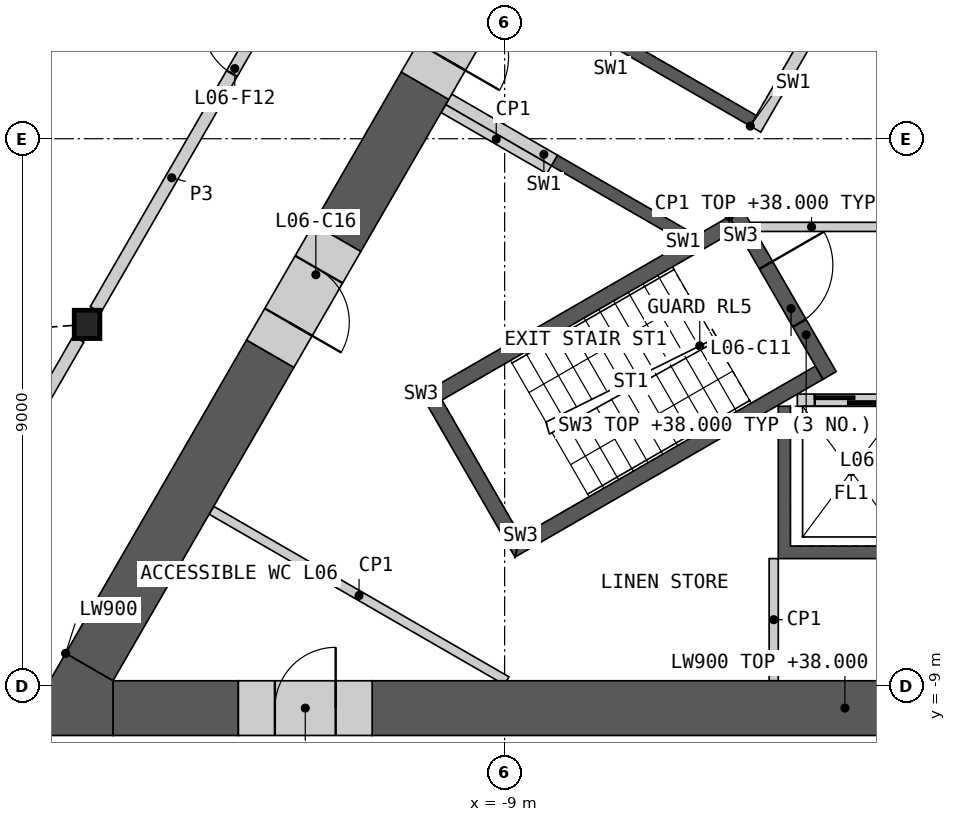
"""IFC4 building model, lengths in metres.
Left out: names, types, materials, properties, quantities, classifications, styles, units other than length and angle.
Written with IfcOpenShell. Run it as: python <this file> out.ifc"""

import sys

from ifc_helpers import new_model, si_unit, direction, frame, frame_2d, origin, origin_2d, place, context, subcontext, project, spatial, polyline, rectangle, i_section, outline, extrude, element, fill, save


model = new_model("IFC4")
c1 = context("Model", 3, precision=1e-05, world=origin(), true_north=direction((0.0, 1.0)))
c2 = subcontext(c1, "Body", "Model", "MODEL_VIEW")
j1 = project(units=[si_unit("LENGTHUNIT", "METRE"), si_unit("PLANEANGLEUNIT", "RADIAN")], contexts=[c1])
p1 = place(None, origin())
s1 = spatial("IfcSite", under=j1, at=p1, CompositionType="ELEMENT")
p2 = place(p1, origin())
s2 = spatial("IfcBuilding", under=s1, at=p2, CompositionType="ELEMENT")
p3 = place(p2, frame((0.0, 0.0, 34.2)))
s3 = spatial("IfcBuildingStorey", under=s2, at=p3, CompositionType="ELEMENT", Elevation=34.2)
p4 = place(p3, frame((-15.868, -3.054, 0.0), z_axis=(0.0, 0.0, 1.0), x_axis=(1.0, 0.0, 0.0)))
e1 = element("IfcColumn", 1, at=p4, inside=s3, PredefinedType="COLUMN", context=c2, shape_type="SweptSolid", body=[
    extrude(i_section(OverallWidth=0.421, OverallDepth=0.465, WebThickness=0.045, FlangeThickness=0.072, at=origin_2d()), origin(), (0.0, 0.0, 1.0), 4.2),
])
p5 = place(p3, origin())
e2 = element("IfcWall", 2, at=p5, inside=s3, PredefinedType="SHEAR", context=c2, shape_type="SweptSolid", body=[
    extrude(outline(polyline([(4.5, -4.4), (4.5, -6.906), (-4.5, -6.906), (-4.5, -4.4), (-4.3, -4.4), (-4.3, -6.7), (-2.3, -6.7), (-2.3, -4.4), (-2.1, -4.4), (-2.1, -6.7), (-0.1, -6.7), (-0.1, -4.4), (0.1, -4.4), (0.1, -6.7), (2.1, -6.7), (2.1, -4.4), (2.3, -4.4), (2.3, -6.7), (4.3, -6.7), (4.3, -4.4), (4.5, -4.4)])), origin(), (0.0, 0.0, 1.0), 3.8),
])
p6 = place(p3, frame((-4.187, -4.3, 0.0), z_axis=(0.0, 0.0, 1.0), x_axis=(1.0, 0.0, 0.0)))
e3 = element("IfcWall", 3, at=p6, inside=s3, PredefinedType="SOLIDWALL", context=c2, shape_type="SweptSolid", body=[
    extrude(rectangle(XDim=8.373, YDim=0.2, at=frame_2d((4.187, 0.0))), origin(), (0.0, 0.0, 1.0), 3.8),
])
p7 = place(p6, frame((0.287, 0.0, 0.0)))
e4 = element("IfcOpeningElement", 4, at=p7, cuts=e3, PredefinedType="OPENING", context=c2, shape_type="SweptSolid", body=[
    extrude(rectangle(XDim=1.2, YDim=2.1, at=frame_2d((0.6, 1.05))), frame((0.0, 0.11, 0.0), z_axis=(0.0, -1.0, 0.0), x_axis=(1.0, 0.0, 0.0)), (0.0, 0.0, 1.0), 0.22),
])
p8 = place(p6, frame((2.387, 0.0, 0.0)))
e5 = element("IfcOpeningElement", 5, at=p8, cuts=e3, PredefinedType="OPENING", context=c2, shape_type="SweptSolid", body=[
    extrude(rectangle(XDim=1.4, YDim=2.1, at=frame_2d((0.7, 1.05))), frame((0.0, 0.11, 0.0), z_axis=(0.0, -1.0, 0.0), x_axis=(1.0, 0.0, 0.0)), (0.0, 0.0, 1.0), 0.22),
])
p9 = place(p6, frame((4.737, 0.0, 0.0)))
e6 = element("IfcOpeningElement", 6, at=p9, cuts=e3, PredefinedType="OPENING", context=c2, shape_type="SweptSolid", body=[
    extrude(rectangle(XDim=1.1, YDim=2.1, at=frame_2d((0.55, 1.05))), frame((0.0, 0.11, 0.0), z_axis=(0.0, -1.0, 0.0), x_axis=(1.0, 0.0, 0.0)), (0.0, 0.0, 1.0), 0.22),
])
p10 = place(p6, frame((6.887, 0.0, 0.0)))
e7 = element("IfcOpeningElement", 7, at=p10, cuts=e3, PredefinedType="OPENING", context=c2, shape_type="SweptSolid", body=[
    extrude(rectangle(XDim=1.2, YDim=2.1, at=frame_2d((0.6, 1.05))), frame((0.0, 0.11, 0.0), z_axis=(0.0, -1.0, 0.0), x_axis=(1.0, 0.0, 0.0)), (0.0, 0.0, 1.0), 0.22),
])
p11 = place(p3, origin())
e8 = element("IfcWall", 8, at=p11, inside=s3, PredefinedType="SHEAR", context=c2, shape_type="SweptSolid", body=[
    extrude(outline(polyline([(-6.061, -1.697), (-8.231, -0.444), (-8.131, -0.271), (-5.96, -1.524), (-6.061, -1.697)])), origin(), (0.0, 0.0, 1.0), 3.8),
])
p12 = place(p3, origin())
e9 = element("IfcWall", 9, at=p12, inside=s3, PredefinedType="SHEAR", context=c2, shape_type="SweptSolid", body=[
    extrude(outline(polyline([(-4.96, 0.208), (-7.131, 1.461), (-3.731, 7.35), (-1.561, 6.097), (-1.66, 5.924), (-3.652, 7.074), (-5.752, 3.437), (-3.76, 2.287), (-3.861, 2.113), (-5.852, 3.263), (-6.852, 1.531), (-4.861, 0.381), (-4.96, 0.208)])), origin(), (0.0, 0.0, 1.0), 3.8),
])
p13 = place(p3, frame((-1.631, 5.776, 0.0), z_axis=(0.0, 0.0, 1.0), x_axis=(-0.499992876559, -0.866029516466, 0.0)))
e10 = element("IfcWall", 10, at=p13, inside=s3, PredefinedType="SOLIDWALL", context=c2, shape_type="SweptSolid", body=[
    extrude(rectangle(XDim=6.486, YDim=0.2, at=frame_2d((3.243, 0.0))), origin(), (0.0, 0.0, 1.0), 3.8),
])
p14 = place(p13, frame((1.537, 0.0, 0.0)))
e11 = element("IfcOpeningElement", 11, at=p14, cuts=e10, PredefinedType="OPENING", context=c2, shape_type="SweptSolid", body=[
    extrude(rectangle(XDim=0.9, YDim=2.1, at=frame_2d((0.45, 1.05))), frame((0.0, 0.11, 0.0), z_axis=(0.0, -1.0, 0.0), x_axis=(1.0, 0.0, 0.0)), (0.0, 0.0, 1.0), 0.22),
])
p15 = place(p3, frame((-8.181, -0.357, 0.0), z_axis=(0.0, 0.0, 1.0), x_axis=(-0.866035824272, 0.499981950752, 0.0)))
e12 = element("IfcWall", 12, at=p15, inside=s3, PredefinedType="SHEAR", context=c2, shape_type="SweptSolid", body=[
    extrude(rectangle(XDim=2.009, YDim=0.2, at=frame_2d((1.004, 0.0))), origin(), (0.0, 0.0, 1.0), 3.8),
])
p16 = place(p3, frame((-4.941, -1.45, 0.0), z_axis=(0.0, 0.0, 1.0), x_axis=(1.0, 0.0, 0.0)))
e13 = element("IfcWall", 13, at=p16, inside=s3, PredefinedType="PARTITIONING", context=c2, shape_type="SweptSolid", body=[
    extrude(rectangle(XDim=9.882, YDim=0.15, at=frame_2d((4.941, 0.0))), origin(), (0.0, 0.0, 1.0), 3.8),
])
p17 = place(p16, frame((4.391, 0.0, 0.0)))
e14 = element("IfcOpeningElement", 14, at=p17, cuts=e13, PredefinedType="OPENING", context=c2, shape_type="SweptSolid", body=[
    extrude(rectangle(XDim=1.1, YDim=2.1, at=frame_2d((0.55, 1.05))), frame((0.0, 0.085, 0.0), z_axis=(0.0, -1.0, 0.0), x_axis=(1.0, 0.0, 0.0)), (0.0, 0.0, 1.0), 0.17),
])
p18 = place(p3, origin())
e15 = element("IfcWall", 15, at=p18, inside=s3, PredefinedType="SHEAR", context=c2, shape_type="SweptSolid", body=[
    extrude(outline(polyline([(-5.307, -1.281), (-10.374, -4.206), (-10.032, -4.298), (-5.182, -1.498), (-5.307, -1.281)])), origin(), (0.0, 0.0, 1.0), 3.8),
])
p19 = place(p3, origin())
e16 = element("IfcWall", 16, at=p19, inside=s3, PredefinedType="SHEAR", context=c2, shape_type="SweptSolid", body=[
    extrude(outline(polyline([(-10.374, -4.206), (-8.83, -6.881), (-8.738, -6.539), (-10.032, -4.298), (-10.374, -4.206)])), origin(), (0.0, 0.0, 1.0), 3.8),
])
p20 = place(p3, origin())
e17 = element("IfcWall", 17, at=p20, inside=s3, PredefinedType="SHEAR", context=c2, shape_type="SweptSolid", body=[
    extrude(outline(polyline([(-8.738, -6.539), (-8.83, -6.881), (-3.763, -3.956), (-3.888, -3.739), (-8.738, -6.539)])), origin(), (0.0, 0.0, 1.0), 3.8),
])
p21 = place(p3, frame((-5.199, -1.219, 0.0), z_axis=(0.0, 0.0, 1.0), x_axis=(0.499982516597, -0.866035497597, 0.0)))
e18 = element("IfcWall", 18, at=p21, inside=s3, PredefinedType="SHEAR", context=c2, shape_type="SweptSolid", body=[
    extrude(rectangle(XDim=3.088, YDim=0.25, at=frame_2d((1.544, 0.0))), origin(), (0.0, 0.0, 1.0), 3.8),
])
p22 = place(p21, frame((0.994, 0.0, 0.0)))
e19 = element("IfcOpeningElement", 19, at=p22, cuts=e18, PredefinedType="OPENING", context=c2, shape_type="SweptSolid", body=[
    extrude(rectangle(XDim=1.1, YDim=2.1, at=frame_2d((0.55, 1.05))), frame((0.0, 0.135, 0.0), z_axis=(0.0, -1.0, 0.0), x_axis=(1.0, 0.0, 0.0)), (0.0, 0.0, 1.0), 0.27),
])
p23 = place(p3, frame((-8.268, -0.509, 0.0), z_axis=(0.0, 0.0, 1.0), x_axis=(-0.866035824272, 0.499981950752, 0.0)))
e20 = element("IfcWall", 20, at=p23, inside=s3, PredefinedType="PARTITIONING", context=c2, shape_type="SweptSolid", body=[
    extrude(rectangle(XDim=2.009, YDim=0.15, at=frame_2d((1.004, 0.0))), origin(), (0.0, 0.0, 1.0), 3.8),
])
p24 = place(p3, frame((-4.575, -6.906, 0.0), z_axis=(0.0, 0.0, 1.0), x_axis=(0.0, -1.0, 0.0)))
e21 = element("IfcWall", 21, at=p24, inside=s3, PredefinedType="PARTITIONING", context=c2, shape_type="SweptSolid", body=[
    extrude(rectangle(XDim=2.009, YDim=0.15, at=frame_2d((1.004, 0.0))), origin(), (0.0, 0.0, 1.0), 3.8),
])
p25 = place(p3, frame((-13.823, -6.111, 0.0), z_axis=(0.0, 0.0, 1.0), x_axis=(0.866026802741, -0.499997576928, 0.0)))
e22 = element("IfcWall", 22, at=p25, inside=s3, PredefinedType="PARTITIONING", context=c2, shape_type="SweptSolid", body=[
    extrude(rectangle(XDim=5.607, YDim=0.15, at=frame_2d((2.804, 0.0))), origin(), (0.0, 0.0, 1.0), 3.8),
])
p26 = place(p3, frame((-11.179, -9.365, 0.0), z_axis=(0.0, 0.0, 1.0), x_axis=(1.0, 0.0, 0.0)))
e23 = element("IfcWall", 23, at=p26, inside=s3, PredefinedType="SHEAR", context=c2, shape_type="SweptSolid", body=[
    extrude(rectangle(XDim=15.55, YDim=0.9, at=frame_2d((7.775, 0.0))), origin(), (0.0, 0.0, 1.0), 3.8),
])
p27 = place(p3, frame((-15.441, -9.365, 0.0), z_axis=(0.0, 0.0, 1.0), x_axis=(1.0, 0.0, 0.0)))
e24 = element("IfcWall", 24, at=p27, inside=s3, PredefinedType="SHEAR", context=c2, shape_type="SweptSolid", body=[
    extrude(rectangle(XDim=2.062, YDim=0.9, at=frame_2d((1.031, 0.0))), origin(), (0.0, 0.0, 1.0), 3.8),
])
p28 = place(p3, frame((-12.855, -3.536, 0.0), z_axis=(0.0, 0.0, 1.0), x_axis=(-0.499999419053, -0.866025739194, 0.0)))
e25 = element("IfcWall", 25, at=p28, inside=s3, PredefinedType="SHEAR", context=c2, shape_type="SweptSolid", body=[
    extrude(rectangle(XDim=5.952, YDim=0.9, at=frame_2d((2.976, 0.0))), origin(), (0.0, 0.0, 1.0), 3.8),
])
p29 = place(p3, frame((-10.31, 0.872, 0.0), z_axis=(0.0, 0.0, 1.0), x_axis=(-0.499946751862, -0.866056144429, 0.0)))
e26 = element("IfcWall", 26, at=p29, inside=s3, PredefinedType="SHEAR", context=c2, shape_type="SweptSolid", body=[
    extrude(rectangle(XDim=2.889, YDim=0.9, at=frame_2d((1.445, 0.0))), origin(), (0.0, 0.0, 1.0), 3.8),
])
p30 = place(p3, origin())
e27 = element("IfcWall", 27, at=p30, inside=s3, PredefinedType="SHEAR", context=c2, shape_type="SweptSolid", body=[
    extrude(outline(polyline([(-16.221, -8.465), (-15.441, -8.915), (-15.441, -9.815), (-17.0, -9.815), (-16.221, -8.465)])), origin(), (0.0, 0.0, 1.0), 3.8),
])
p31 = place(p3, frame((-13.379, -9.365, 0.0), z_axis=(0.0, 0.0, 1.0), x_axis=(1.0, 0.0, 0.0)))
e28 = element("IfcWall", 28, at=p31, inside=s3, PredefinedType="SHEAR", context=c2, shape_type="SweptSolid", body=[
    extrude(rectangle(XDim=2.2, YDim=0.9, at=frame_2d((1.1, 0.0))), origin(), (0.0, 0.0, 1.0), 3.8),
])
p32 = place(p31, frame((0.6, 0.0, 0.0)))
e29 = element("IfcOpeningElement", 29, at=p32, cuts=e28, PredefinedType="OPENING", context=c2, shape_type="SweptSolid", body=[
    extrude(rectangle(XDim=1.0, YDim=2.1, at=frame_2d((0.5, 1.05))), frame((0.0, 0.46, 0.0), z_axis=(0.0, -1.0, 0.0), x_axis=(1.0, 0.0, 0.0)), (0.0, 0.0, 1.0), 0.92),
])
p33 = place(p3, frame((-11.755, -1.63, 0.0), z_axis=(0.0, 0.0, 1.0), x_axis=(-0.50002983664, -0.866008176907, 0.0)))
e30 = element("IfcWall", 30, at=p33, inside=s3, PredefinedType="SHEAR", context=c2, shape_type="SweptSolid", body=[
    extrude(rectangle(XDim=2.2, YDim=0.9, at=frame_2d((1.1, 0.0))), origin(), (0.0, 0.0, 1.0), 3.8),
])
p34 = place(p33, frame((0.6, 0.0, 0.0)))
e31 = element("IfcOpeningElement", 31, at=p34, cuts=e30, PredefinedType="OPENING", context=c2, shape_type="SweptSolid", body=[
    extrude(rectangle(XDim=1.0, YDim=2.1, at=frame_2d((0.5, 1.05))), frame((0.0, 0.46, 0.0), z_axis=(0.0, -1.0, 0.0), x_axis=(1.0, 0.0, 0.0)), (0.0, 0.0, 1.0), 0.92),
])
p35 = place(p3, frame((-9.21, 2.777, 0.0), z_axis=(0.0, 0.0, 1.0), x_axis=(-0.500077893725, -0.86598042715, 0.0)))
e32 = element("IfcWall", 32, at=p35, inside=s3, PredefinedType="SHEAR", context=c2, shape_type="SweptSolid", body=[
    extrude(rectangle(XDim=2.2, YDim=0.9, at=frame_2d((1.1, 0.0))), origin(), (0.0, 0.0, 1.0), 3.8),
])
p36 = place(p35, frame((0.55, 0.0, 0.0)))
e33 = element("IfcOpeningElement", 33, at=p36, cuts=e32, PredefinedType="OPENING", context=c2, shape_type="SweptSolid", body=[
    extrude(rectangle(XDim=1.1, YDim=2.1, at=frame_2d((0.55, 1.05))), frame((0.0, 0.46, 0.0), z_axis=(0.0, -1.0, 0.0), x_axis=(1.0, 0.0, 0.0)), (0.0, 0.0, 1.0), 0.92),
])
p37 = place(p3, frame((-15.728, -2.811, 0.0), z_axis=(0.0, 0.0, 1.0), x_axis=(0.49999175339, 0.866030164915, 0.0)))
e34 = element("IfcWall", 34, at=p37, inside=s3, PredefinedType="PARTITIONING", context=c2, shape_type="SweptSolid", body=[
    extrude(rectangle(XDim=10.019, YDim=0.2, at=frame_2d((5.009, 0.0))), origin(), (0.0, 0.0, 1.0), 3.8),
])
p38 = place(p37, frame((4.484, 0.0, 0.0)))
e35 = element("IfcOpeningElement", 35, at=p38, cuts=e34, PredefinedType="OPENING", context=c2, shape_type="SweptSolid", body=[
    extrude(rectangle(XDim=0.95, YDim=2.1, at=frame_2d((0.475, 1.05))), frame((0.0, 0.11, 0.0), z_axis=(0.0, -1.0, 0.0), x_axis=(1.0, 0.0, 0.0)), (0.0, 0.0, 1.0), 0.22),
])
p39 = place(p3, frame((-19.244, -8.902, 0.0), z_axis=(0.0, 0.0, 1.0), x_axis=(0.499984737558, 0.86603421538, 0.0)))
e36 = element("IfcWall", 36, at=p39, inside=s3, PredefinedType="PARTITIONING", context=c2, shape_type="SweptSolid", body=[
    extrude(rectangle(XDim=6.473, YDim=0.2, at=frame_2d((3.236, 0.0))), origin(), (0.0, 0.0, 1.0), 3.8),
])
p40 = place(p3, frame((-22.335, -7.455, 0.0), z_axis=(0.0, 0.0, 1.0), x_axis=(0.499997414609, 0.866026896456, 0.0)))
e37 = element("IfcWall", 37, at=p40, inside=s3, PredefinedType="PARTITIONING", context=c2, shape_type="SweptSolid", body=[
    extrude(rectangle(XDim=17.524, YDim=0.2, at=frame_2d((8.762, 0.0))), origin(), (0.0, 0.0, 1.0), 2.885),
])
p41 = place(p40, frame((7.584, 0.0, 0.0)))
e38 = element("IfcOpeningElement", 38, at=p41, cuts=e37, PredefinedType="OPENING", context=c2, shape_type="SweptSolid", body=[
    extrude(rectangle(XDim=0.95, YDim=2.1, at=frame_2d((0.475, 1.05))), frame((0.0, 0.11, 0.0), z_axis=(0.0, -1.0, 0.0), x_axis=(1.0, 0.0, 0.0)), (0.0, 0.0, 1.0), 0.22),
])
p42 = place(p7, origin())
e39 = element("IfcDoor", 39, at=p42, inside=s3, OperationType="SLIDING_TO_LEFT", PredefinedType="DOOR", context=c2, shape_type="SweptSolid", body=[
    extrude(rectangle(XDim=1.2, YDim=2.1, at=frame_2d((0.6, 1.05))), frame((0.0, 0.025, 0.0), z_axis=(0.0, -1.0, 0.0), x_axis=(1.0, 0.0, 0.0)), (0.0, 0.0, 1.0), 0.05),
])
fill(e4, e39)
p43 = place(p22, origin())
e40 = element("IfcDoor", 40, at=p43, inside=s3, OperationType="SINGLE_SWING_LEFT", PredefinedType="DOOR", context=c2, shape_type="SweptSolid", body=[
    extrude(rectangle(XDim=1.1, YDim=2.1, at=frame_2d((0.55, 1.05))), frame((0.0, 0.025, 0.0), z_axis=(0.0, -1.0, 0.0), x_axis=(1.0, 0.0, 0.0)), (0.0, 0.0, 1.0), 0.05),
])
fill(e19, e40)
p44 = place(p32, origin())
e41 = element("IfcDoor", 41, at=p44, inside=s3, OperationType="SINGLE_SWING_RIGHT", PredefinedType="DOOR", context=c2, shape_type="SweptSolid", body=[
    extrude(rectangle(XDim=1.0, YDim=2.1, at=frame_2d((0.5, 1.05))), frame((0.0, 0.205, 0.0), z_axis=(0.0, -1.0, 0.0), x_axis=(1.0, 0.0, 0.0)), (0.0, 0.0, 1.0), 0.05),
])
fill(e29, e41)
p45 = place(p34, origin())
e42 = element("IfcDoor", 42, at=p45, inside=s3, OperationType="SINGLE_SWING_RIGHT", PredefinedType="DOOR", context=c2, shape_type="SweptSolid", body=[
    extrude(rectangle(XDim=1.0, YDim=2.1, at=frame_2d((0.5, 1.05))), frame((0.0, 0.205, 0.0), z_axis=(0.0, -1.0, 0.0), x_axis=(1.0, 0.0, 0.0)), (0.0, 0.0, 1.0), 0.05),
])
fill(e31, e42)
p46 = place(p36, origin())
e43 = element("IfcDoor", 43, at=p46, inside=s3, OperationType="SINGLE_SWING_RIGHT", PredefinedType="DOOR", context=c2, shape_type="SweptSolid", body=[
    extrude(rectangle(XDim=1.1, YDim=2.1, at=frame_2d((0.55, 1.05))), frame((0.0, 0.205, 0.0), z_axis=(0.0, -1.0, 0.0), x_axis=(1.0, 0.0, 0.0)), (0.0, 0.0, 1.0), 0.05),
])
fill(e33, e43)
p47 = place(p38, origin())
e44 = element("IfcDoor", 44, at=p47, inside=s3, OperationType="SINGLE_SWING_RIGHT", PredefinedType="DOOR", context=c2, shape_type="SweptSolid", body=[
    extrude(rectangle(XDim=0.95, YDim=2.1, at=frame_2d((0.475, 1.05))), frame((0.0, 0.025, 0.0), z_axis=(0.0, -1.0, 0.0), x_axis=(1.0, 0.0, 0.0)), (0.0, 0.0, 1.0), 0.05),
])
fill(e35, e44)
save(model, sys.argv[1])
